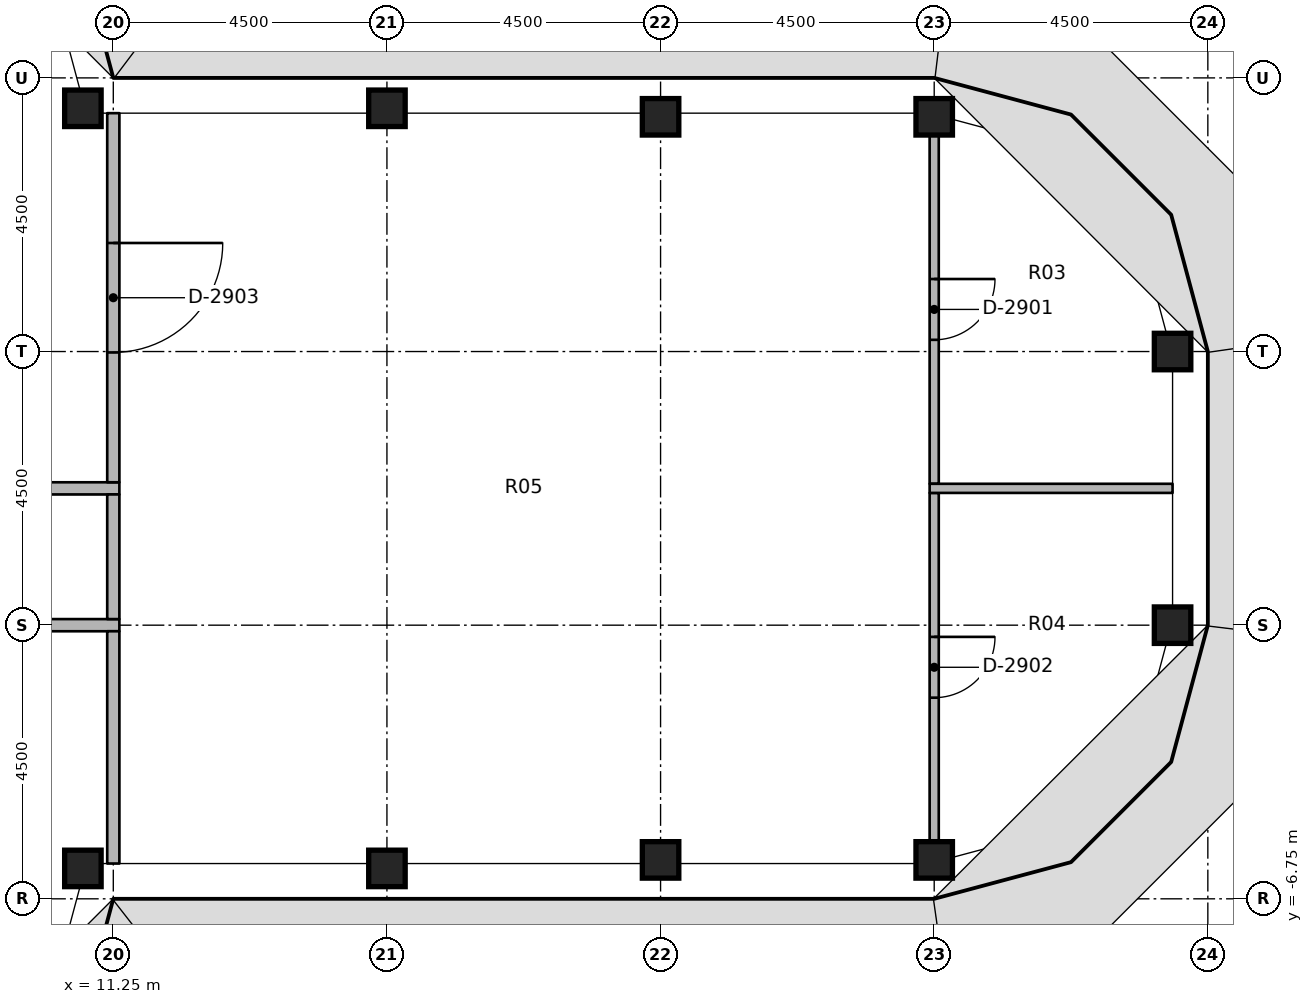
"""IFC4 building model, lengths in metres.
Left out: names, types, materials, properties, quantities, classifications, styles, units other than length and angle.
Written with IfcOpenShell. Run it as: python <this file> out.ifc"""

import sys

from ifc_helpers import new_model, si_unit, direction, frame, frame_2d, origin, origin_2d, place, context, subcontext, project, spatial, rectangle, extrude, element, fill, save


model = new_model("IFC4")
c1 = context("Model", 3, precision=1e-05, world=origin(), true_north=direction((0.0, 1.0)))
c2 = subcontext(c1, "Body", "Model", "MODEL_VIEW")
j1 = project(units=[si_unit("LENGTHUNIT", "METRE"), si_unit("PLANEANGLEUNIT", "RADIAN")], contexts=[c1])
p1 = place(None, origin())
s1 = spatial("IfcSite", under=j1, at=p1, CompositionType="ELEMENT")
p2 = place(p1, origin())
s2 = spatial("IfcBuilding", under=s1, at=p2, CompositionType="ELEMENT")
p3 = place(p2, frame((0.0, 0.0, 276.4)))
s3 = spatial("IfcBuildingStorey", under=s2, at=p3, CompositionType="ELEMENT", Elevation=276.4)
for number, where, z_axis, x_axis in (
    (1, (10.75, -6.25, 0.0), (0.0, 0.0, 1.0), (1.0, 0.0, 0.0)),
    (2, (10.75, 6.25, 0.0), (0.0, 0.0, 1.0), (1.0, 0.0, 0.0)),
    (3, (15.75, -6.25, 0.0), (0.0, 0.0, 1.0), (1.0, 0.0, 0.0)),
    (4, (15.75, 6.25, 0.0), (0.0, 0.0, 1.0), (1.0, 0.0, 0.0)),
    (5, (20.25, -6.11, 0.0), (0.0, 0.0, 1.0), (1.0, 0.0, 0.0)),
    (6, (20.25, 6.11, 0.0), (0.0, 0.0, 1.0), (1.0, 0.0, 0.0)),
    (7, (24.75, -6.11, 0.0), (0.0, 0.0, 1.0), (1.0, 0.0, 0.0)),
    (8, (24.75, 6.11, 0.0), (0.0, 0.0, 1.0), (1.0, 0.0, 0.0)),
    (9, (28.67, -2.25, 0.0), (0.0, 0.0, 1.0), (1.0, 0.0, 0.0)),
    (10, (28.67, 2.25, 0.0), (0.0, 0.0, 1.0), (1.0, 0.0, 0.0)),
):
    element("IfcColumn", number, at=place(p3, frame(where, z_axis=z_axis, x_axis=x_axis)), inside=s3, PredefinedType="COLUMN", context=c2, shape_type="SweptSolid", body=[
        extrude(rectangle(XDim=0.6, YDim=0.6, at=origin_2d()), origin(), (0.0, 0.0, 1.0), 3.65),
    ])
p4 = place(p3, frame((6.65, 0.0, 0.0), z_axis=(0.0, 0.0, 1.0), x_axis=(1.0, 0.0, 0.0)))
e11 = element("IfcWall", 11, at=p4, inside=s3, PredefinedType="PARTITIONING", context=c2, shape_type="SweptSolid", body=[
    extrude(rectangle(XDim=4.7, YDim=0.2, at=frame_2d((2.35, 0.0))), origin(), (0.0, 0.0, 1.0), 2.75),
])
p5 = place(p4, frame((1.85, 0.0, 0.0)))
e12 = element("IfcOpeningElement", 12, at=p5, cuts=e11, PredefinedType="OPENING", context=c2, shape_type="SweptSolid", body=[
    extrude(rectangle(XDim=1.0, YDim=2.1, at=frame_2d((0.5, 1.05))), frame((0.0, 0.11, 0.0), z_axis=(0.0, -1.0, 0.0), x_axis=(1.0, 0.0, 0.0)), (0.0, 0.0, 1.0), 0.22),
])
p6 = place(p3, frame((11.35, -2.25, 0.0), z_axis=(0.0, 0.0, 1.0), x_axis=(-1.0, 0.0, 0.0)))
e13 = element("IfcWall", 13, at=p6, inside=s3, PredefinedType="PARTITIONING", context=c2, shape_type="SweptSolid", body=[
    extrude(rectangle(XDim=4.7, YDim=0.2, at=frame_2d((2.35, 0.0))), origin(), (0.0, 0.0, 1.0), 2.75),
])
p7 = place(p6, frame((1.85, 0.0, 0.0)))
e14 = element("IfcOpeningElement", 14, at=p7, cuts=e13, PredefinedType="OPENING", context=c2, shape_type="SweptSolid", body=[
    extrude(rectangle(XDim=1.0, YDim=2.1, at=frame_2d((0.5, 1.05))), frame((0.0, 0.11, 0.0), z_axis=(0.0, -1.0, 0.0), x_axis=(1.0, 0.0, 0.0)), (0.0, 0.0, 1.0), 0.22),
])
p8 = place(p3, frame((11.25, -2.15, 0.0), z_axis=(0.0, 0.0, 1.0), x_axis=(0.0, 1.0, 0.0)))
e15 = element("IfcWall", 15, at=p8, inside=s3, PredefinedType="PARTITIONING", context=c2, shape_type="SweptSolid", body=[
    extrude(rectangle(XDim=2.05, YDim=0.2, at=frame_2d((1.025, 0.0))), origin(), (0.0, 0.0, 1.0), 2.75),
])
p9 = place(p3, frame((11.25, 6.17, 0.0), z_axis=(0.0, 0.0, 1.0), x_axis=(0.0, -1.0, 0.0)))
e16 = element("IfcWall", 16, at=p9, inside=s3, PredefinedType="PARTITIONING", context=c2, shape_type="SweptSolid", body=[
    extrude(rectangle(XDim=6.07, YDim=0.2, at=frame_2d((3.035, 0.0))), origin(), (0.0, 0.0, 1.0), 2.75),
])
p10 = place(p9, frame((2.135, 0.0, 0.0)))
e17 = element("IfcOpeningElement", 17, at=p10, cuts=e16, PredefinedType="OPENING", context=c2, shape_type="SweptSolid", body=[
    extrude(rectangle(XDim=1.8, YDim=2.1, at=frame_2d((0.9, 1.05))), frame((0.0, 0.11, 0.0), z_axis=(0.0, -1.0, 0.0), x_axis=(1.0, 0.0, 0.0)), (0.0, 0.0, 1.0), 0.22),
])
p11 = place(p3, frame((11.25, -6.17, 0.0), z_axis=(0.0, 0.0, 1.0), x_axis=(0.0, 1.0, 0.0)))
e18 = element("IfcWall", 18, at=p11, inside=s3, PredefinedType="PARTITIONING", context=c2, shape_type="SweptSolid", body=[
    extrude(rectangle(XDim=3.82, YDim=0.2, at=frame_2d((1.91, 0.0))), origin(), (0.0, 0.0, 1.0), 2.75),
])
p12 = place(p3, frame((24.75, 5.81, 0.0), z_axis=(0.0, 0.0, 1.0), x_axis=(0.0, -1.0, 0.0)))
e19 = element("IfcWall", 19, at=p12, inside=s3, PredefinedType="PARTITIONING", context=c2, shape_type="SweptSolid", body=[
    extrude(rectangle(XDim=5.735, YDim=0.15, at=frame_2d((2.868, 0.0))), origin(), (0.0, 0.0, 1.0), 2.75),
])
p13 = place(p12, frame((2.367, 0.0, 0.0)))
e20 = element("IfcOpeningElement", 20, at=p13, cuts=e19, PredefinedType="OPENING", context=c2, shape_type="SweptSolid", body=[
    extrude(rectangle(XDim=1.0, YDim=2.1, at=frame_2d((0.5, 1.05))), frame((0.0, 0.085, 0.0), z_axis=(0.0, -1.0, 0.0), x_axis=(1.0, 0.0, 0.0)), (0.0, 0.0, 1.0), 0.17),
])
p14 = place(p3, frame((24.75, -0.075, 0.0), z_axis=(0.0, 0.0, 1.0), x_axis=(0.0, -1.0, 0.0)))
e21 = element("IfcWall", 21, at=p14, inside=s3, PredefinedType="PARTITIONING", context=c2, shape_type="SweptSolid", body=[
    extrude(rectangle(XDim=5.735, YDim=0.15, at=frame_2d((2.868, 0.0))), origin(), (0.0, 0.0, 1.0), 2.75),
])
p15 = place(p14, frame((2.367, 0.0, 0.0)))
e22 = element("IfcOpeningElement", 22, at=p15, cuts=e21, PredefinedType="OPENING", context=c2, shape_type="SweptSolid", body=[
    extrude(rectangle(XDim=1.0, YDim=2.1, at=frame_2d((0.5, 1.05))), frame((0.0, 0.085, 0.0), z_axis=(0.0, -1.0, 0.0), x_axis=(1.0, 0.0, 0.0)), (0.0, 0.0, 1.0), 0.17),
])
p16 = place(p3, frame((24.675, 0.0, 0.0), z_axis=(0.0, 0.0, 1.0), x_axis=(1.0, 0.0, 0.0)))
e23 = element("IfcWall", 23, at=p16, inside=s3, PredefinedType="PARTITIONING", context=c2, shape_type="SweptSolid", body=[
    extrude(rectangle(XDim=3.995, YDim=0.15, at=frame_2d((1.998, 0.0))), origin(), (0.0, 0.0, 1.0), 2.75),
])
p17 = place(p13, origin())
e24 = element("IfcDoor", 24, at=p17, inside=s3, OperationType="SINGLE_SWING_RIGHT", PredefinedType="DOOR", context=c2, shape_type="SweptSolid", body=[
    extrude(rectangle(XDim=1.0, YDim=2.1, at=frame_2d((0.5, 1.05))), frame((0.0, 0.025, 0.0), z_axis=(0.0, -1.0, 0.0), x_axis=(1.0, 0.0, 0.0)), (0.0, 0.0, 1.0), 0.05),
])
fill(e20, e24)
p18 = place(p15, origin())
e25 = element("IfcDoor", 25, at=p18, inside=s3, OperationType="SINGLE_SWING_RIGHT", PredefinedType="DOOR", context=c2, shape_type="SweptSolid", body=[
    extrude(rectangle(XDim=1.0, YDim=2.1, at=frame_2d((0.5, 1.05))), frame((0.0, 0.025, 0.0), z_axis=(0.0, -1.0, 0.0), x_axis=(1.0, 0.0, 0.0)), (0.0, 0.0, 1.0), 0.05),
])
fill(e22, e25)
p19 = place(p10, origin())
e26 = element("IfcDoor", 26, at=p19, inside=s3, OperationType="DOUBLE_DOOR_SINGLE_SWING", PredefinedType="DOOR", context=c2, shape_type="SweptSolid", body=[
    extrude(rectangle(XDim=1.8, YDim=2.1, at=frame_2d((0.9, 1.05))), frame((0.0, 0.025, 0.0), z_axis=(0.0, -1.0, 0.0), x_axis=(1.0, 0.0, 0.0)), (0.0, 0.0, 1.0), 0.05),
])
fill(e17, e26)
save(model, sys.argv[1])
